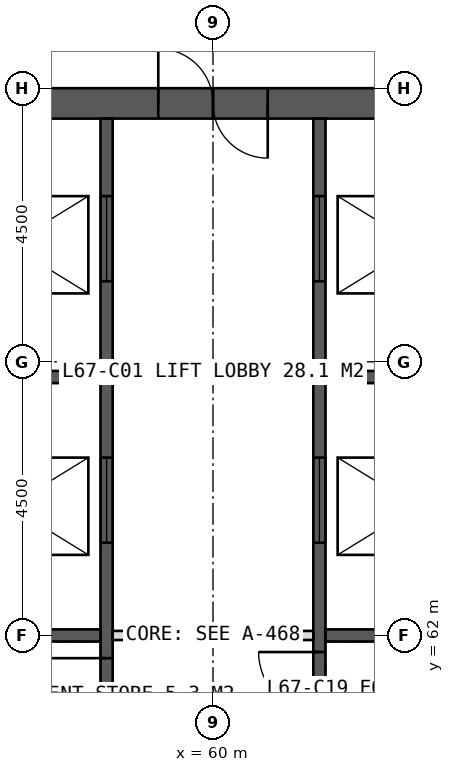
"""IFC4 building model, lengths in metres.
Left out: names, types, materials, properties, quantities, classifications, styles, units other than length and angle.
Written with IfcOpenShell. Run it as: python <this file> out.ifc"""

import sys

from ifc_helpers import new_model, si_unit, direction, frame, frame_2d, origin, place, context, subcontext, project, spatial, rectangle, extrude, element, fill, save


model = new_model("IFC4")
c1 = context("Model", 3, precision=1e-05, world=origin(), true_north=direction((0.0, 1.0)))
c2 = subcontext(c1, "Body", "Model", "MODEL_VIEW")
j1 = project(units=[si_unit("LENGTHUNIT", "METRE"), si_unit("PLANEANGLEUNIT", "RADIAN")], contexts=[c1])
p1 = place(None, origin())
s1 = spatial("IfcSite", under=j1, at=p1, CompositionType="ELEMENT")
p2 = place(p1, origin())
s2 = spatial("IfcBuilding", under=s1, at=p2, CompositionType="ELEMENT")
p3 = place(p2, frame((0.0, 0.0, 278.0)))
s3 = spatial("IfcBuildingStorey", under=s2, at=p3, CompositionType="ELEMENT", Elevation=278.0)
p4 = place(p3, frame((51.0, 70.75, 0.0), z_axis=(0.0, 0.0, 1.0), x_axis=(1.0, 0.0, 0.0)))
e1 = element("IfcWall", 1, at=p4, inside=s3, PredefinedType="SHEAR", context=c2, shape_type="SweptSolid", body=[
    extrude(rectangle(XDim=18.0, YDim=0.5, at=frame_2d((9.0, 0.0))), origin(), (0.0, 0.0, 1.0), 4.0),
])
p5 = place(p4, frame((8.1, 0.0, 0.0)))
e2 = element("IfcOpeningElement", 2, at=p5, cuts=e1, PredefinedType="OPENING", context=c2, shape_type="SweptSolid", body=[
    extrude(rectangle(XDim=1.8, YDim=2.2, at=frame_2d((0.9, 1.1))), frame((0.0, 0.26, 0.0), z_axis=(0.0, -1.0, 0.0), x_axis=(1.0, 0.0, 0.0)), (0.0, 0.0, 1.0), 0.52),
])
p6 = place(p3, frame((58.25, 53.5, 0.0), z_axis=(0.0, 0.0, 1.0), x_axis=(0.0, 1.0, 0.0)))
e3 = element("IfcWall", 3, at=p6, inside=s3, PredefinedType="SHEAR", context=c2, shape_type="SweptSolid", body=[
    extrude(rectangle(XDim=17.0, YDim=0.2, at=frame_2d((8.5, 0.0))), origin(), (0.0, 0.0, 1.0), 4.0),
])
p7 = place(p6, frame((0.496, 0.0, 0.0)))
e4 = element("IfcOpeningElement", 4, at=p7, cuts=e3, PredefinedType="OPENING", context=c2, shape_type="SweptSolid", body=[
    extrude(rectangle(XDim=1.0, YDim=2.1, at=frame_2d((0.5, 1.05))), frame((0.0, 0.11, 0.0), z_axis=(0.0, -1.0, 0.0), x_axis=(1.0, 0.0, 0.0)), (0.0, 0.0, 1.0), 0.22),
])
p8 = place(p6, frame((2.646, 0.0, 0.0)))
e5 = element("IfcOpeningElement", 5, at=p8, cuts=e3, PredefinedType="OPENING", context=c2, shape_type="SweptSolid", body=[
    extrude(rectangle(XDim=1.0, YDim=2.1, at=frame_2d((0.5, 1.05))), frame((0.0, 0.11, 0.0), z_axis=(0.0, -1.0, 0.0), x_axis=(1.0, 0.0, 0.0)), (0.0, 0.0, 1.0), 0.22),
])
p9 = place(p6, frame((5.027, 0.0, 0.0)))
e6 = element("IfcOpeningElement", 6, at=p9, cuts=e3, PredefinedType="OPENING", context=c2, shape_type="SweptSolid", body=[
    extrude(rectangle(XDim=1.0, YDim=2.1, at=frame_2d((0.5, 1.05))), frame((0.0, 0.11, 0.0), z_axis=(0.0, -1.0, 0.0), x_axis=(1.0, 0.0, 0.0)), (0.0, 0.0, 1.0), 0.22),
])
p10 = place(p6, frame((7.126, 0.0, 0.0)))
e7 = element("IfcOpeningElement", 7, at=p10, cuts=e3, PredefinedType="OPENING", context=c2, shape_type="SweptSolid", body=[
    extrude(rectangle(XDim=1.0, YDim=2.1, at=frame_2d((0.5, 1.05))), frame((0.0, 0.11, 0.0), z_axis=(0.0, -1.0, 0.0), x_axis=(1.0, 0.0, 0.0)), (0.0, 0.0, 1.0), 0.22),
])
p11 = place(p6, frame((10.025, 0.0, 0.0)))
e8 = element("IfcOpeningElement", 8, at=p11, cuts=e3, PredefinedType="OPENING", context=c2, shape_type="SweptSolid", body=[
    extrude(rectangle(XDim=1.4, YDim=2.2, at=frame_2d((0.7, 1.1))), frame((0.0, 0.11, 0.0), z_axis=(0.0, -1.0, 0.0), x_axis=(1.0, 0.0, 0.0)), (0.0, 0.0, 1.0), 0.22),
])
p12 = place(p6, frame((14.325, 0.0, 0.0)))
e9 = element("IfcOpeningElement", 9, at=p12, cuts=e3, PredefinedType="OPENING", context=c2, shape_type="SweptSolid", body=[
    extrude(rectangle(XDim=1.4, YDim=2.2, at=frame_2d((0.7, 1.1))), frame((0.0, 0.11, 0.0), z_axis=(0.0, -1.0, 0.0), x_axis=(1.0, 0.0, 0.0)), (0.0, 0.0, 1.0), 0.22),
])
p13 = place(p3, frame((61.75, 53.5, 0.0), z_axis=(0.0, 0.0, 1.0), x_axis=(0.0, 1.0, 0.0)))
e10 = element("IfcWall", 10, at=p13, inside=s3, PredefinedType="SHEAR", context=c2, shape_type="SweptSolid", body=[
    extrude(rectangle(XDim=17.0, YDim=0.2, at=frame_2d((8.5, 0.0))), origin(), (0.0, 0.0, 1.0), 4.0),
])
p14 = place(p13, frame((0.393, 0.0, 0.0)))
e11 = element("IfcOpeningElement", 11, at=p14, cuts=e10, PredefinedType="OPENING", context=c2, shape_type="SweptSolid", body=[
    extrude(rectangle(XDim=1.0, YDim=2.1, at=frame_2d((0.5, 1.05))), frame((0.0, 0.11, 0.0), z_axis=(0.0, -1.0, 0.0), x_axis=(1.0, 0.0, 0.0)), (0.0, 0.0, 1.0), 0.22),
])
p15 = place(p13, frame((2.542, 0.0, 0.0)))
e12 = element("IfcOpeningElement", 12, at=p15, cuts=e10, PredefinedType="OPENING", context=c2, shape_type="SweptSolid", body=[
    extrude(rectangle(XDim=1.0, YDim=2.1, at=frame_2d((0.5, 1.05))), frame((0.0, 0.11, 0.0), z_axis=(0.0, -1.0, 0.0), x_axis=(1.0, 0.0, 0.0)), (0.0, 0.0, 1.0), 0.22),
])
p16 = place(p13, frame((5.127, 0.0, 0.0)))
e13 = element("IfcOpeningElement", 13, at=p16, cuts=e10, PredefinedType="OPENING", context=c2, shape_type="SweptSolid", body=[
    extrude(rectangle(XDim=1.0, YDim=2.1, at=frame_2d((0.5, 1.05))), frame((0.0, 0.11, 0.0), z_axis=(0.0, -1.0, 0.0), x_axis=(1.0, 0.0, 0.0)), (0.0, 0.0, 1.0), 0.22),
])
p17 = place(p13, frame((7.228, 0.0, 0.0)))
e14 = element("IfcOpeningElement", 14, at=p17, cuts=e10, PredefinedType="OPENING", context=c2, shape_type="SweptSolid", body=[
    extrude(rectangle(XDim=1.0, YDim=2.1, at=frame_2d((0.5, 1.05))), frame((0.0, 0.11, 0.0), z_axis=(0.0, -1.0, 0.0), x_axis=(1.0, 0.0, 0.0)), (0.0, 0.0, 1.0), 0.22),
])
p18 = place(p13, frame((10.025, 0.0, 0.0)))
e15 = element("IfcOpeningElement", 15, at=p18, cuts=e10, PredefinedType="OPENING", context=c2, shape_type="SweptSolid", body=[
    extrude(rectangle(XDim=1.4, YDim=2.2, at=frame_2d((0.7, 1.1))), frame((0.0, 0.11, 0.0), z_axis=(0.0, -1.0, 0.0), x_axis=(1.0, 0.0, 0.0)), (0.0, 0.0, 1.0), 0.22),
])
p19 = place(p13, frame((14.325, 0.0, 0.0)))
e16 = element("IfcOpeningElement", 16, at=p19, cuts=e10, PredefinedType="OPENING", context=c2, shape_type="SweptSolid", body=[
    extrude(rectangle(XDim=1.4, YDim=2.2, at=frame_2d((0.7, 1.1))), frame((0.0, 0.11, 0.0), z_axis=(0.0, -1.0, 0.0), x_axis=(1.0, 0.0, 0.0)), (0.0, 0.0, 1.0), 0.22),
])
for number, where, z_axis, x_axis in (
    (17, (55.1, 62.0, 0.0), (0.0, 0.0, 1.0), (1.0, 0.0, 0.0)),
    (18, (61.85, 62.0, 0.0), (0.0, 0.0, 1.0), (1.0, 0.0, 0.0)),
    (19, (55.1, 66.25, 0.0), (0.0, 0.0, 1.0), (1.0, 0.0, 0.0)),
    (20, (61.85, 66.25, 0.0), (0.0, 0.0, 1.0), (1.0, 0.0, 0.0)),
):
    element("IfcWall", number, at=place(p3, frame(where, z_axis=z_axis, x_axis=x_axis)), inside=s3, PredefinedType="SHEAR", context=c2, shape_type="SweptSolid", body=[
        extrude(rectangle(XDim=3.05, YDim=0.2, at=frame_2d((1.525, 0.0))), origin(), (0.0, 0.0, 1.0), 4.0),
    ])
p20 = place(p3, frame((58.35, 62.0, 0.0), z_axis=(0.0, 0.0, 1.0), x_axis=(1.0, 0.0, 0.0)))
e21 = element("IfcWall", 21, at=p20, inside=s3, PredefinedType="PARTITIONING", context=c2, shape_type="SweptSolid", body=[
    extrude(rectangle(XDim=3.3, YDim=0.15, at=frame_2d((1.65, 0.0))), origin(), (0.0, 0.0, 1.0), 3.75),
])
p21 = place(p5, origin())
e22 = element("IfcDoor", 22, at=p21, inside=s3, OperationType="DOUBLE_DOOR_SINGLE_SWING", PredefinedType="DOOR", context=c2, shape_type="SweptSolid", body=[
    extrude(rectangle(XDim=1.8, YDim=2.2, at=frame_2d((0.9, 1.1))), frame((0.0, 0.025, 0.0), z_axis=(0.0, -1.0, 0.0), x_axis=(1.0, 0.0, 0.0)), (0.0, 0.0, 1.0), 0.05),
])
fill(e2, e22)
p22 = place(p10, origin())
e23 = element("IfcDoor", 23, at=p22, inside=s3, OperationType="SINGLE_SWING_RIGHT", PredefinedType="DOOR", context=c2, shape_type="SweptSolid", body=[
    extrude(rectangle(XDim=1.0, YDim=2.1, at=frame_2d((0.5, 1.05))), frame((0.0, 0.025, 0.0), z_axis=(0.0, -1.0, 0.0), x_axis=(1.0, 0.0, 0.0)), (0.0, 0.0, 1.0), 0.05),
])
fill(e7, e23)
p23 = place(p17, origin())
e24 = element("IfcDoor", 24, at=p23, inside=s3, OperationType="SINGLE_SWING_RIGHT", PredefinedType="DOOR", context=c2, shape_type="SweptSolid", body=[
    extrude(rectangle(XDim=1.0, YDim=2.1, at=frame_2d((0.5, 1.05))), frame((0.0, 0.025, 0.0), z_axis=(0.0, -1.0, 0.0), x_axis=(1.0, 0.0, 0.0)), (0.0, 0.0, 1.0), 0.05),
])
fill(e14, e24)
p24 = place(p11, origin())
e25 = element("IfcDoor", 25, at=p24, inside=s3, OperationType="SLIDING_TO_LEFT", PredefinedType="DOOR", context=c2, shape_type="SweptSolid", body=[
    extrude(rectangle(XDim=1.4, YDim=2.2, at=frame_2d((0.7, 1.1))), frame((0.0, 0.025, 0.0), z_axis=(0.0, -1.0, 0.0), x_axis=(1.0, 0.0, 0.0)), (0.0, 0.0, 1.0), 0.05),
])
fill(e8, e25)
p25 = place(p18, origin())
e26 = element("IfcDoor", 26, at=p25, inside=s3, OperationType="SLIDING_TO_LEFT", PredefinedType="DOOR", context=c2, shape_type="SweptSolid", body=[
    extrude(rectangle(XDim=1.4, YDim=2.2, at=frame_2d((0.7, 1.1))), frame((0.0, 0.025, 0.0), z_axis=(0.0, -1.0, 0.0), x_axis=(1.0, 0.0, 0.0)), (0.0, 0.0, 1.0), 0.05),
])
fill(e15, e26)
p26 = place(p12, origin())
e27 = element("IfcDoor", 27, at=p26, inside=s3, OperationType="SLIDING_TO_LEFT", PredefinedType="DOOR", context=c2, shape_type="SweptSolid", body=[
    extrude(rectangle(XDim=1.4, YDim=2.2, at=frame_2d((0.7, 1.1))), frame((0.0, 0.025, 0.0), z_axis=(0.0, -1.0, 0.0), x_axis=(1.0, 0.0, 0.0)), (0.0, 0.0, 1.0), 0.05),
])
fill(e9, e27)
p27 = place(p19, origin())
e28 = element("IfcDoor", 28, at=p27, inside=s3, OperationType="SLIDING_TO_LEFT", PredefinedType="DOOR", context=c2, shape_type="SweptSolid", body=[
    extrude(rectangle(XDim=1.4, YDim=2.2, at=frame_2d((0.7, 1.1))), frame((0.0, 0.025, 0.0), z_axis=(0.0, -1.0, 0.0), x_axis=(1.0, 0.0, 0.0)), (0.0, 0.0, 1.0), 0.05),
])
fill(e16, e28)
save(model, sys.argv[1])
